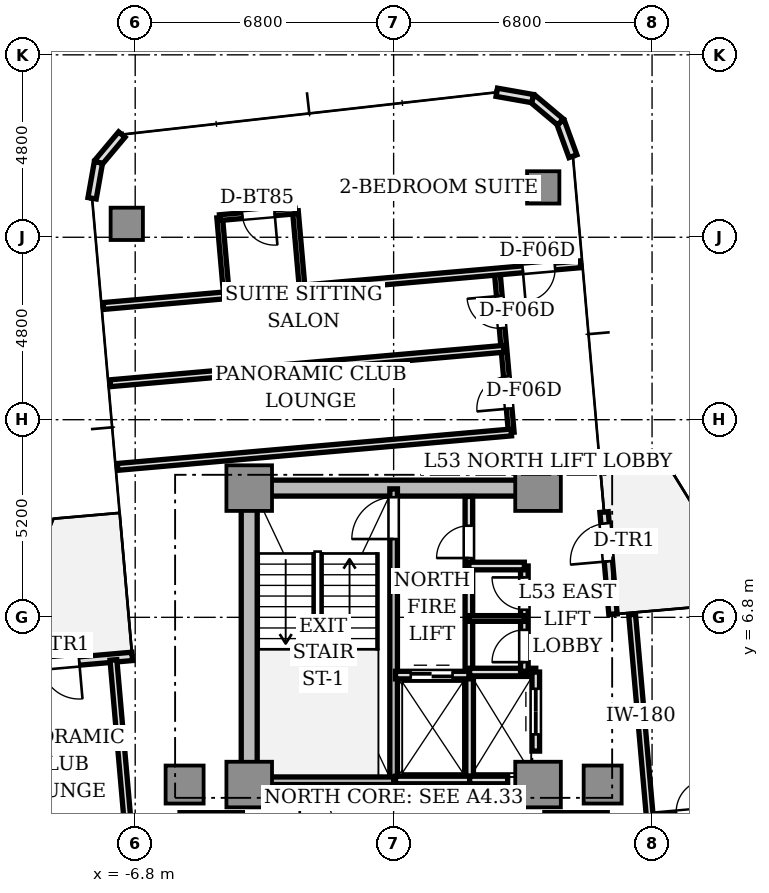
"""IFC4 building model, lengths in metres.
Left out: names, types, materials, properties, quantities, classifications, styles, units other than length and angle.
Written with IfcOpenShell. Run it as: python <this file> out.ifc"""

import sys

from ifc_helpers import new_model, si_unit, direction, frame, frame_2d, origin, origin_2d, place, context, subcontext, project, spatial, rectangle, extrude, source, transform, mapped, element, fill, save


model = new_model("IFC4")
c1 = context("Model", 3, precision=1e-05, world=origin(), true_north=direction((0.0, 1.0)))
c2 = subcontext(c1, "Body", "Model", "MODEL_VIEW")
j1 = project(units=[si_unit("LENGTHUNIT", "METRE"), si_unit("PLANEANGLEUNIT", "RADIAN")], contexts=[c1])
p1 = place(None, origin())
s1 = spatial("IfcSite", under=j1, at=p1, CompositionType="ELEMENT")
p2 = place(p1, origin())
s2 = spatial("IfcBuilding", under=s1, at=p2, CompositionType="ELEMENT")
p3 = place(p2, frame((0.0, 0.0, 191.95)))
s3 = spatial("IfcBuildingStorey", under=s2, at=p3, CompositionType="ELEMENT", Elevation=191.95)
p4 = place(p3, frame((-3.55, 10.2, 0.0), z_axis=(0.0, 0.0, 1.0), x_axis=(1.0, 0.0, 0.0)))
e1 = element("IfcWall", 1, at=p4, inside=s3, PredefinedType="SHEAR", context=c2, shape_type="SweptSolid", body=[
    extrude(rectangle(XDim=7.1, YDim=0.42, at=frame_2d((3.55, 0.0))), origin(), (0.0, 0.0, 1.0), 3.11),
])
p5 = place(p3, frame((-3.8, 2.85, 0.0), z_axis=(0.0, 0.0, 1.0), x_axis=(0.0, 1.0, 0.0)))
e2 = element("IfcWall", 2, at=p5, inside=s3, PredefinedType="SHEAR", context=c2, shape_type="SweptSolid", body=[
    extrude(rectangle(XDim=6.9, YDim=0.42, at=frame_2d((3.45, 0.0))), origin(), (0.0, 0.0, 1.0), 3.11),
])
m1 = source(origin(), c2, "Body", "SweptSolid", [
    extrude(rectangle(XDim=1.2, YDim=1.2, at=origin_2d()), origin(), (0.0, 0.0, 1.0), 3.11),
])
for number, where, z_axis, x_axis in (
    (3, (-3.8, 2.4, 0.0), (0.0, 0.0, 1.0), (1.0, 0.0, 0.0)),
    (4, (3.8, 2.4, 0.0), (0.0, 0.0, 1.0), (1.0, 0.0, 0.0)),
    (5, (-3.8, 10.2, 0.0), (0.0, 0.0, 1.0), (1.0, 0.0, 0.0)),
    (6, (3.8, 10.2, 0.0), (0.0, 0.0, 1.0), (1.0, 0.0, 0.0)),
):
    element("IfcColumn", number, at=place(p3, frame(where, z_axis=z_axis, x_axis=x_axis)), inside=s3, PredefinedType="COLUMN", context=c2, shape_type="MappedRepresentation", body=[
        mapped(m1, transform((0.0, 0.0, 0.0), scale=1.0)),
    ])
m2 = source(origin(), c2, "Body", "SweptSolid", [
    extrude(rectangle(XDim=1.0, YDim=1.0, at=origin_2d()), origin(), (0.0, 0.0, 1.0), 3.11),
])
for number, where, z_axis, x_axis in (
    (7, (5.5, 2.4, 0.0), (0.0, 0.0, 1.0), (1.0, 0.0, 0.0)),
    (8, (-5.5, 2.4, 0.0), (0.0, 0.0, 1.0), (1.0, 0.0, 0.0)),
):
    element("IfcColumn", number, at=place(p3, frame(where, z_axis=z_axis, x_axis=x_axis)), inside=s3, PredefinedType="COLUMN", context=c2, shape_type="MappedRepresentation", body=[
        mapped(m2, transform((0.0, 0.0, 0.0), scale=1.0)),
    ])
m3 = source(origin(), c2, "Body", "SweptSolid", [
    extrude(rectangle(XDim=0.85, YDim=0.85, at=origin_2d()), origin(), (0.0, 0.0, 1.0), 3.11),
])
for number, where, z_axis, x_axis in (
    (9, (3.936, 18.112, 0.0), (0.0, 0.0, 1.0), (1.0, 0.0, 0.0)),
    (10, (-7.022, 17.153, 0.0), (0.0, 0.0, 1.0), (1.0, 0.0, 0.0)),
):
    element("IfcColumn", number, at=place(p3, frame(where, z_axis=z_axis, x_axis=x_axis)), inside=s3, PredefinedType="COLUMN", context=c2, shape_type="MappedRepresentation", body=[
        mapped(m3, transform((0.0, 0.0, 0.0), scale=1.0)),
    ])
p6 = place(p3, frame((5.772, 6.879, 0.0), z_axis=(0.0, 0.0, 1.0), x_axis=(-0.087168071984, 0.996193619346, 0.0)))
e11 = element("IfcWall", 11, at=p6, inside=s3, PredefinedType="STANDARD", context=c2, shape_type="SweptSolid", body=[
    extrude(rectangle(XDim=2.7, YDim=0.22, at=frame_2d((1.35, 0.0))), origin(), (0.0, 0.0, 1.0), 3.11),
])
p7 = place(p6, frame((1.4, 0.0, 0.0)))
e12 = element("IfcOpeningElement", 12, at=p7, cuts=e11, PredefinedType="OPENING", context=c2, shape_type="SweptSolid", body=[
    extrude(rectangle(XDim=1.0, YDim=2.2, at=frame_2d((0.5, 1.1))), frame((0.0, 0.12, 0.0), z_axis=(0.0, -1.0, 0.0), x_axis=(1.0, 0.0, 0.0)), (0.0, 0.0, 1.0), 0.24),
])
p8 = place(p3, frame((4.718, 18.933, 0.0), z_axis=(0.0, 0.0, 1.0), x_axis=(-0.34188635151, 0.939741306239, 0.0)))
e13 = element("IfcWall", 13, at=p8, inside=s3, PredefinedType="STANDARD", context=c2, shape_type="SweptSolid", body=[
    extrude(rectangle(XDim=0.958, YDim=0.22, at=frame_2d((0.479, 0.0))), origin(), (0.0, 0.0, 1.0), 3.11),
])
for number, where, z_axis, x_axis in (
    (14, (4.39, 19.833, 0.0), (0.0, 0.0, 1.0), (-0.766, 0.643, 0.0)),
    (15, (3.657, 20.449, 0.0), (0.0, 0.0, 1.0), (-0.985, 0.174, 0.0)),
):
    element("IfcWall", number, at=place(p3, frame(where, z_axis=z_axis, x_axis=x_axis)), inside=s3, PredefinedType="STANDARD", context=c2, shape_type="SweptSolid", body=[
        extrude(rectangle(XDim=0.958, YDim=0.22, at=frame_2d((0.479, 0.0))), origin(), (0.0, 0.0, 1.0), 3.11),
    ])
for number, where, z_axis, x_axis in (
    (16, (-7.152, 19.503, 0.0), (0.0, 0.0, 1.0), (-0.643, -0.766, 0.0)),
    (17, (-7.768, 18.769, 0.0), (0.0, 0.0, 1.0), (-0.174, -0.985, 0.0)),
):
    element("IfcWall", number, at=place(p3, frame(where, z_axis=z_axis, x_axis=x_axis)), inside=s3, PredefinedType="STANDARD", context=c2, shape_type="SweptSolid", body=[
        extrude(rectangle(XDim=0.958, YDim=0.22, at=frame_2d((0.479, 0.0))), origin(), (0.0, 0.0, 1.0), 3.11),
    ])
p9 = place(p3, frame((-6.879, 5.772, 0.0), z_axis=(0.0, 0.0, 1.0), x_axis=(-0.996193619346, -0.087168071984, 0.0)))
e18 = element("IfcWall", 18, at=p9, inside=s3, PredefinedType="STANDARD", context=c2, shape_type="SweptSolid", body=[
    extrude(rectangle(XDim=2.7, YDim=0.22, at=frame_2d((1.35, 0.0))), origin(), (0.0, 0.0, 1.0), 3.11),
])
p10 = place(p9, frame((1.4, 0.0, 0.0)))
e19 = element("IfcOpeningElement", 19, at=p10, cuts=e18, PredefinedType="OPENING", context=c2, shape_type="SweptSolid", body=[
    extrude(rectangle(XDim=1.0, YDim=2.2, at=frame_2d((0.5, 1.1))), frame((0.0, 0.12, 0.0), z_axis=(0.0, -1.0, 0.0), x_axis=(1.0, 0.0, 0.0)), (0.0, 0.0, 1.0), 0.24),
])
p11 = place(p3, frame((0.0, 2.5, 0.0), z_axis=(0.0, 0.0, 1.0), x_axis=(0.0, 1.0, 0.0)))
e20 = element("IfcWall", 20, at=p11, inside=s3, PredefinedType="SOLIDWALL", context=c2, shape_type="SweptSolid", body=[
    extrude(rectangle(XDim=7.68, YDim=0.2, at=frame_2d((3.84, 0.0))), origin(), (0.0, 0.0, 1.0), 3.11),
])
p12 = place(p11, frame((6.36, 0.0, 0.0)))
e21 = element("IfcOpeningElement", 21, at=p12, cuts=e20, PredefinedType="OPENING", context=c2, shape_type="SweptSolid", body=[
    extrude(rectangle(XDim=1.1, YDim=2.15, at=frame_2d((0.55, 1.075))), frame((0.0, 0.11, 0.0), z_axis=(0.0, -1.0, 0.0), x_axis=(1.0, 0.0, 0.0)), (0.0, 0.0, 1.0), 0.22),
])
p13 = place(p3, frame((-3.72, 2.5, 0.0), z_axis=(0.0, 0.0, 1.0), x_axis=(1.0, 0.0, 0.0)))
e22 = element("IfcWall", 22, at=p13, inside=s3, PredefinedType="SOLIDWALL", context=c2, shape_type="SweptSolid", body=[
    extrude(rectangle(XDim=3.72, YDim=0.2, at=frame_2d((1.86, 0.0))), origin(), (0.0, 0.0, 1.0), 3.11),
])
p14 = place(p3, frame((1.98, 5.32, 0.0), z_axis=(0.0, 0.0, 1.0), x_axis=(0.0, 1.0, 0.0)))
e23 = element("IfcWall", 23, at=p14, inside=s3, PredefinedType="SOLIDWALL", context=c2, shape_type="SweptSolid", body=[
    extrude(rectangle(XDim=4.66, YDim=0.2, at=frame_2d((2.33, 0.0))), origin(), (0.0, 0.0, 1.0), 2.66),
])
p15 = place(p14, frame((3.04, 0.0, 0.0)))
e24 = element("IfcOpeningElement", 24, at=p15, cuts=e23, PredefinedType="OPENING", context=c2, shape_type="SweptSolid", body=[
    extrude(rectangle(XDim=0.85, YDim=2.1, at=frame_2d((0.425, 1.05))), frame((0.0, 0.11, 0.0), z_axis=(0.0, -1.0, 0.0), x_axis=(1.0, 0.0, 0.0)), (0.0, 0.0, 1.0), 0.22),
])
p16 = place(p3, frame((2.0, 2.5, 0.0), z_axis=(0.0, 0.0, 1.0), x_axis=(0.0, 1.0, 0.0)))
e25 = element("IfcWall", 25, at=p16, inside=s3, PredefinedType="SOLIDWALL", context=c2, shape_type="SweptSolid", body=[
    extrude(rectangle(XDim=2.78, YDim=0.2, at=frame_2d((1.39, 0.0))), origin(), (0.0, 0.0, 1.0), 2.66),
])
p17 = place(p3, frame((0.05, 2.52, 0.0), z_axis=(0.0, 0.0, 1.0), x_axis=(1.0, 0.0, 0.0)))
e26 = element("IfcWall", 26, at=p17, inside=s3, PredefinedType="SOLIDWALL", context=c2, shape_type="SweptSolid", body=[
    extrude(rectangle(XDim=1.95, YDim=0.2, at=frame_2d((0.975, 0.0))), origin(), (0.0, 0.0, 1.0), 2.66),
])
p18 = place(p3, frame((0.05, 5.28, 0.0), z_axis=(0.0, 0.0, 1.0), x_axis=(1.0, 0.0, 0.0)))
e27 = element("IfcWall", 27, at=p18, inside=s3, PredefinedType="SOLIDWALL", context=c2, shape_type="SweptSolid", body=[
    extrude(rectangle(XDim=1.93, YDim=0.2, at=frame_2d((0.965, 0.0))), origin(), (0.0, 0.0, 1.0), 2.66),
])
p19 = place(p18, frame((0.4, 0.0, 0.0)))
e28 = element("IfcOpeningElement", 28, at=p19, cuts=e27, PredefinedType="OPENING", context=c2, shape_type="SweptSolid", body=[
    extrude(rectangle(XDim=1.1, YDim=2.2, at=frame_2d((0.55, 1.1))), frame((0.0, 0.11, 0.0), z_axis=(0.0, -1.0, 0.0), x_axis=(1.0, 0.0, 0.0)), (0.0, 0.0, 1.0), 0.22),
])
p20 = place(p3, frame((2.0, 2.52, 0.0), z_axis=(0.0, 0.0, 1.0), x_axis=(1.0, 0.0, 0.0)))
e29 = element("IfcWall", 29, at=p20, inside=s3, PredefinedType="SOLIDWALL", context=c2, shape_type="SweptSolid", body=[
    extrude(rectangle(XDim=1.0, YDim=0.2, at=frame_2d((0.5, 0.0))), origin(), (0.0, 0.0, 1.0), 2.66),
])
p21 = place(p3, frame((2.0, 5.36, 0.0), z_axis=(0.0, 0.0, 1.0), x_axis=(1.0, 0.0, 0.0)))
e30 = element("IfcWall", 30, at=p21, inside=s3, PredefinedType="SOLIDWALL", context=c2, shape_type="SweptSolid", body=[
    extrude(rectangle(XDim=1.74, YDim=0.2, at=frame_2d((0.87, 0.0))), origin(), (0.0, 0.0, 1.0), 2.66),
])
p22 = place(p3, frame((3.74, 3.28, 0.0), z_axis=(0.0, 0.0, 1.0), x_axis=(0.0, 1.0, 0.0)))
e31 = element("IfcWall", 31, at=p22, inside=s3, PredefinedType="SOLIDWALL", context=c2, shape_type="SweptSolid", body=[
    extrude(rectangle(XDim=2.08, YDim=0.2, at=frame_2d((1.04, 0.0))), origin(), (0.0, 0.0, 1.0), 2.66),
])
p23 = place(p22, frame((0.44, 0.0, 0.0)))
e32 = element("IfcOpeningElement", 32, at=p23, cuts=e31, PredefinedType="OPENING", context=c2, shape_type="SweptSolid", body=[
    extrude(rectangle(XDim=1.2, YDim=2.2, at=frame_2d((0.6, 1.1))), frame((0.0, 0.11, 0.0), z_axis=(0.0, -1.0, 0.0), x_axis=(1.0, 0.0, 0.0)), (0.0, 0.0, 1.0), 0.22),
])
for number, where, z_axis, x_axis in (
    (33, (3.98, 1.56, 0.0), (0.0, 0.0, 1.0), (1.0, 0.0, 0.0)),
    (34, (-5.62, 1.56, 0.0), (0.0, 0.0, 1.0), (1.0, 0.0, 0.0)),
):
    element("IfcWall", number, at=place(p3, frame(where, z_axis=z_axis, x_axis=x_axis)), inside=s3, PredefinedType="SOLIDWALL", context=c2, shape_type="SweptSolid", body=[
        extrude(rectangle(XDim=1.64, YDim=0.2, at=frame_2d((0.82, 0.0))), origin(), (0.0, 0.0, 1.0), 2.66),
    ])
p24 = place(p3, frame((3.44, 5.38, 0.0), z_axis=(0.0, 0.0, 1.0), x_axis=(0.0, 1.0, 0.0)))
e35 = element("IfcWall", 35, at=p24, inside=s3, PredefinedType="SOLIDWALL", context=c2, shape_type="SweptSolid", body=[
    extrude(rectangle(XDim=2.77, YDim=0.2, at=frame_2d((1.385, 0.0))), origin(), (0.0, 0.0, 1.0), 2.66),
])
p25 = place(p24, frame((0.24, 0.0, 0.0)))
e36 = element("IfcOpeningElement", 36, at=p25, cuts=e35, PredefinedType="OPENING", context=c2, shape_type="SweptSolid", body=[
    extrude(rectangle(XDim=0.85, YDim=2.1, at=frame_2d((0.425, 1.05))), frame((0.0, 0.11, 0.0), z_axis=(0.0, -1.0, 0.0), x_axis=(1.0, 0.0, 0.0)), (0.0, 0.0, 1.0), 0.22),
])
p26 = place(p24, frame((1.62, 0.0, 0.0)))
e37 = element("IfcOpeningElement", 37, at=p26, cuts=e35, PredefinedType="OPENING", context=c2, shape_type="SweptSolid", body=[
    extrude(rectangle(XDim=0.85, YDim=2.1, at=frame_2d((0.425, 1.05))), frame((0.0, 0.11, 0.0), z_axis=(0.0, -1.0, 0.0), x_axis=(1.0, 0.0, 0.0)), (0.0, 0.0, 1.0), 0.22),
])
p27 = place(p3, frame((1.98, 8.15, 0.0), z_axis=(0.0, 0.0, 1.0), x_axis=(1.0, 0.0, 0.0)))
e38 = element("IfcWall", 38, at=p27, inside=s3, PredefinedType="SOLIDWALL", context=c2, shape_type="SweptSolid", body=[
    extrude(rectangle(XDim=1.46, YDim=0.2, at=frame_2d((0.73, 0.0))), origin(), (0.0, 0.0, 1.0), 2.66),
])
p28 = place(p3, frame((1.98, 6.77, 0.0), z_axis=(0.0, 0.0, 1.0), x_axis=(1.0, 0.0, 0.0)))
e39 = element("IfcWall", 39, at=p28, inside=s3, PredefinedType="PARTITIONING", context=c2, shape_type="SweptSolid", body=[
    extrude(rectangle(XDim=1.46, YDim=0.15, at=frame_2d((0.73, 0.0))), origin(), (0.0, 0.0, 1.0), 2.66),
])
p29 = place(p3, frame((6.741, 1.543, 0.0), z_axis=(0.0, 0.0, 1.0), x_axis=(0.996195062465, 0.087151577845, 0.0)))
e40 = element("IfcWall", 40, at=p29, inside=s3, PredefinedType="PARTITIONING", context=c2, shape_type="SweptSolid", body=[
    extrude(rectangle(XDim=13.2, YDim=0.15, at=frame_2d((6.6, 0.0))), origin(), (0.0, 0.0, 1.0), 2.66),
])
p30 = place(p29, frame((0.7, 0.0, 0.0)))
e41 = element("IfcOpeningElement", 41, at=p30, cuts=e40, PredefinedType="OPENING", context=c2, shape_type="SweptSolid", body=[
    extrude(rectangle(XDim=0.85, YDim=2.1, at=frame_2d((0.425, 1.05))), frame((0.0, 0.085, 0.0), z_axis=(0.0, -1.0, 0.0), x_axis=(1.0, 0.0, 0.0)), (0.0, 0.0, 1.0), 0.17),
])
p31 = place(p29, frame((4.952, 0.0, 0.0)))
e42 = element("IfcOpeningElement", 42, at=p31, cuts=e40, PredefinedType="OPENING", context=c2, shape_type="SweptSolid", body=[
    extrude(rectangle(XDim=0.85, YDim=2.1, at=frame_2d((0.425, 1.05))), frame((0.0, 0.085, 0.0), z_axis=(0.0, -1.0, 0.0), x_axis=(1.0, 0.0, 0.0)), (0.0, 0.0, 1.0), 0.17),
])
p32 = place(p29, frame((9.44, 0.0, 0.0)))
e43 = element("IfcOpeningElement", 43, at=p32, cuts=e40, PredefinedType="OPENING", context=c2, shape_type="SweptSolid", body=[
    extrude(rectangle(XDim=0.85, YDim=2.1, at=frame_2d((0.425, 1.05))), frame((0.0, 0.085, 0.0), z_axis=(0.0, -1.0, 0.0), x_axis=(1.0, 0.0, 0.0)), (0.0, 0.0, 1.0), 0.17),
])
p33 = place(p3, frame((6.741, 1.543, 0.0), z_axis=(0.0, 0.0, 1.0), x_axis=(-0.087161289348, 0.996194212812, 0.0)))
e44 = element("IfcWall", 44, at=p33, inside=s3, PredefinedType="PARTITIONING", context=c2, shape_type="SweptSolid", body=[
    extrude(rectangle(XDim=5.35, YDim=0.18, at=frame_2d((2.675, 0.0))), origin(), (0.0, 0.0, 1.0), 2.66),
])
p34 = place(p3, frame((3.095, 11.664, 0.0), z_axis=(0.0, 0.0, 1.0), x_axis=(-0.087142722004, 0.996195837173, 0.0)))
e45 = element("IfcWall", 45, at=p34, inside=s3, PredefinedType="PARTITIONING", context=c2, shape_type="SweptSolid", body=[
    extrude(rectangle(XDim=4.25, YDim=0.15, at=frame_2d((2.125, 0.0))), origin(), (0.0, 0.0, 1.0), 2.66),
])
p35 = place(p34, frame((0.63, 0.0, 0.0)))
e46 = element("IfcOpeningElement", 46, at=p35, cuts=e45, PredefinedType="OPENING", context=c2, shape_type="SweptSolid", body=[
    extrude(rectangle(XDim=0.85, YDim=2.1, at=frame_2d((0.425, 1.05))), frame((0.0, 0.085, 0.0), z_axis=(0.0, -1.0, 0.0), x_axis=(1.0, 0.0, 0.0)), (0.0, 0.0, 1.0), 0.17),
])
p36 = place(p34, frame((2.755, 0.0, 0.0)))
e47 = element("IfcOpeningElement", 47, at=p36, cuts=e45, PredefinedType="OPENING", context=c2, shape_type="SweptSolid", body=[
    extrude(rectangle(XDim=0.85, YDim=2.1, at=frame_2d((0.425, 1.05))), frame((0.0, 0.085, 0.0), z_axis=(0.0, -1.0, 0.0), x_axis=(1.0, 0.0, 0.0)), (0.0, 0.0, 1.0), 0.17),
])
p37 = place(p3, frame((3.095, 11.664, 0.0), z_axis=(0.0, 0.0, 1.0), x_axis=(-0.996196061386, -0.087140158824, 0.0)))
e48 = element("IfcWall", 48, at=p37, inside=s3, PredefinedType="PARTITIONING", context=c2, shape_type="SweptSolid", body=[
    extrude(rectangle(XDim=10.4, YDim=0.18, at=frame_2d((5.2, 0.0))), origin(), (0.0, 0.0, 1.0), 2.66),
])
p38 = place(p3, frame((2.903, 13.866, 0.0), z_axis=(0.0, 0.0, 1.0), x_axis=(-0.996194201607, -0.087161417409, 0.0)))
e49 = element("IfcWall", 49, at=p38, inside=s3, PredefinedType="PARTITIONING", context=c2, shape_type="SweptSolid", body=[
    extrude(rectangle(XDim=10.4, YDim=0.18, at=frame_2d((5.2, 0.0))), origin(), (0.0, 0.0, 1.0), 2.66),
])
p39 = place(p3, frame((4.917, 16.09, 0.0), z_axis=(0.0, 0.0, 1.0), x_axis=(-0.996196619285, -0.087133780622, 0.0)))
e50 = element("IfcWall", 50, at=p39, inside=s3, PredefinedType="PARTITIONING", context=c2, shape_type="SweptSolid", body=[
    extrude(rectangle(XDim=12.6, YDim=0.18, at=frame_2d((6.3, 0.0))), origin(), (0.0, 0.0, 1.0), 2.66),
])
p40 = place(p39, frame((0.675, 0.0, 0.0)))
e51 = element("IfcOpeningElement", 51, at=p40, cuts=e50, PredefinedType="OPENING", context=c2, shape_type="SweptSolid", body=[
    extrude(rectangle(XDim=0.85, YDim=2.1, at=frame_2d((0.425, 1.05))), frame((0.0, 0.1, 0.0), z_axis=(0.0, -1.0, 0.0), x_axis=(1.0, 0.0, 0.0)), (0.0, 0.0, 1.0), 0.2),
])
for number, where, z_axis, x_axis in (
    (52, (-4.398, 15.275, 0.0), (0.0, 0.0, 1.0), (-0.087, 0.996, 0.0)),
    (53, (-2.406, 15.449, 0.0), (0.0, 0.0, 1.0), (-0.087, 0.996, 0.0)),
):
    element("IfcWall", number, at=place(p3, frame(where, z_axis=z_axis, x_axis=x_axis)), inside=s3, PredefinedType="PARTITIONING", context=c2, shape_type="SweptSolid", body=[
        extrude(rectangle(XDim=2.05, YDim=0.15, at=frame_2d((1.025, 0.0))), origin(), (0.0, 0.0, 1.0), 2.66),
    ])
p41 = place(p3, frame((-2.584, 17.491, 0.0), z_axis=(0.0, 0.0, 1.0), x_axis=(-0.99619464492, -0.087156350505, 0.0)))
e54 = element("IfcWall", 54, at=p41, inside=s3, PredefinedType="PARTITIONING", context=c2, shape_type="SweptSolid", body=[
    extrude(rectangle(XDim=2.0, YDim=0.15, at=frame_2d((1.0, 0.0))), origin(), (0.0, 0.0, 1.0), 2.63),
])
p42 = place(p41, frame((0.55, 0.0, 0.0)))
e55 = element("IfcOpeningElement", 55, at=p42, cuts=e54, PredefinedType="OPENING", context=c2, shape_type="SweptSolid", body=[
    extrude(rectangle(XDim=0.85, YDim=2.1, at=frame_2d((0.425, 1.05))), frame((0.0, 0.085, 0.0), z_axis=(0.0, -1.0, 0.0), x_axis=(1.0, 0.0, 0.0)), (0.0, 0.0, 1.0), 0.17),
])
p43 = place(p3, frame((-7.373, 5.679, 0.0), z_axis=(0.0, 0.0, 1.0), x_axis=(0.087161289348, -0.996194212812, 0.0)))
e56 = element("IfcWall", 56, at=p43, inside=s3, PredefinedType="PARTITIONING", context=c2, shape_type="SweptSolid", body=[
    extrude(rectangle(XDim=5.35, YDim=0.18, at=frame_2d((2.675, 0.0))), origin(), (0.0, 0.0, 1.0), 2.66),
])
m4 = source(origin(), c2, "Body", "SweptSolid", [
    extrude(rectangle(XDim=1.0, YDim=0.05, at=origin_2d()), origin(), (0.0, 0.0, 1.0), 2.2),
])
p44 = place(p7, frame((0.5, 0.0, 0.0)))
e57 = element("IfcDoor", 57, at=p44, inside=s3, OperationType="SINGLE_SWING_LEFT", PredefinedType="DOOR", context=c2, shape_type="MappedRepresentation", body=[
    mapped(m4, transform((0.0, 0.0, 0.0), scale=1.0)),
])
fill(e12, e57)
p45 = place(p10, frame((0.5, 0.0, 0.0)))
e58 = element("IfcDoor", 58, at=p45, inside=s3, OperationType="SINGLE_SWING_LEFT", PredefinedType="DOOR", context=c2, shape_type="MappedRepresentation", body=[
    mapped(m4, transform((0.0, 0.0, 0.0), scale=1.0)),
])
fill(e19, e58)
m5 = source(origin(), c2, "Body", "SweptSolid", [
    extrude(rectangle(XDim=1.1, YDim=0.05, at=origin_2d()), origin(), (0.0, 0.0, 1.0), 2.15),
])
p46 = place(p12, frame((0.55, 0.0, 0.0)))
e59 = element("IfcDoor", 59, at=p46, inside=s3, OperationType="SINGLE_SWING_LEFT", PredefinedType="DOOR", context=c2, shape_type="MappedRepresentation", body=[
    mapped(m5, transform((0.0, 0.0, 0.0), scale=1.0)),
])
fill(e21, e59)
m6 = source(origin(), c2, "Body", "SweptSolid", [
    extrude(rectangle(XDim=0.85, YDim=0.05, at=origin_2d()), origin(), (0.0, 0.0, 1.0), 2.1),
])
p47 = place(p15, frame((0.425, 0.0, 0.0)))
e60 = element("IfcDoor", 60, at=p47, inside=s3, OperationType="SINGLE_SWING_LEFT", PredefinedType="DOOR", context=c2, shape_type="MappedRepresentation", body=[
    mapped(m6, transform((0.0, 0.0, 0.0), scale=1.0)),
])
fill(e24, e60)
m7 = source(origin(), c2, "Body", "SweptSolid", [
    extrude(rectangle(XDim=1.1, YDim=0.05, at=origin_2d()), origin(), (0.0, 0.0, 1.0), 2.2),
])
p48 = place(p19, frame((0.55, 0.0, 0.0)))
e61 = element("IfcDoor", 61, at=p48, inside=s3, OperationType="DOUBLE_DOOR_SLIDING", PredefinedType="DOOR", context=c2, shape_type="MappedRepresentation", body=[
    mapped(m7, transform((0.0, 0.0, 0.0), scale=1.0)),
])
fill(e28, e61)
m8 = source(origin(), c2, "Body", "SweptSolid", [
    extrude(rectangle(XDim=1.2, YDim=0.05, at=origin_2d()), origin(), (0.0, 0.0, 1.0), 2.2),
])
p49 = place(p23, frame((0.6, 0.0, 0.0)))
e62 = element("IfcDoor", 62, at=p49, inside=s3, OperationType="DOUBLE_DOOR_SLIDING", PredefinedType="DOOR", context=c2, shape_type="MappedRepresentation", body=[
    mapped(m8, transform((0.0, 0.0, 0.0), scale=1.0)),
])
fill(e32, e62)
p50 = place(p25, frame((0.425, 0.0, 0.0)))
e63 = element("IfcDoor", 63, at=p50, inside=s3, OperationType="SINGLE_SWING_LEFT", PredefinedType="DOOR", context=c2, shape_type="MappedRepresentation", body=[
    mapped(m6, transform((0.0, 0.0, 0.0), scale=1.0)),
])
fill(e36, e63)
p51 = place(p26, frame((0.425, 0.0, 0.0)))
e64 = element("IfcDoor", 64, at=p51, inside=s3, OperationType="SINGLE_SWING_RIGHT", PredefinedType="DOOR", context=c2, shape_type="MappedRepresentation", body=[
    mapped(m6, transform((0.0, 0.0, 0.0), scale=1.0)),
])
fill(e37, e64)
p52 = place(p30, frame((0.425, 0.0, 0.0)))
e65 = element("IfcDoor", 65, at=p52, inside=s3, OperationType="SINGLE_SWING_RIGHT", PredefinedType="DOOR", context=c2, shape_type="MappedRepresentation", body=[
    mapped(m6, transform((0.0, 0.0, 0.0), scale=1.0)),
])
fill(e41, e65)
p53 = place(p35, frame((0.425, 0.0, 0.0)))
e66 = element("IfcDoor", 66, at=p53, inside=s3, OperationType="SINGLE_SWING_LEFT", PredefinedType="DOOR", context=c2, shape_type="MappedRepresentation", body=[
    mapped(m6, transform((0.0, 0.0, 0.0), scale=1.0)),
])
fill(e46, e66)
p54 = place(p36, frame((0.425, 0.0, 0.0)))
e67 = element("IfcDoor", 67, at=p54, inside=s3, OperationType="SINGLE_SWING_RIGHT", PredefinedType="DOOR", context=c2, shape_type="MappedRepresentation", body=[
    mapped(m6, transform((0.0, 0.0, 0.0), scale=1.0)),
])
fill(e47, e67)
p55 = place(p42, frame((0.425, 0.0, 0.0)))
e68 = element("IfcDoor", 68, at=p55, inside=s3, OperationType="SINGLE_SWING_LEFT", PredefinedType="DOOR", context=c2, shape_type="MappedRepresentation", body=[
    mapped(m6, transform((0.0, 0.0, 0.0), scale=1.0)),
])
fill(e55, e68)
p56 = place(p40, frame((0.425, 0.0, 0.0)))
e69 = element("IfcDoor", 69, at=p56, inside=s3, OperationType="SINGLE_SWING_RIGHT", PredefinedType="DOOR", context=c2, shape_type="MappedRepresentation", body=[
    mapped(m6, transform((0.0, 0.0, 0.0), scale=1.0)),
])
fill(e51, e69)
save(model, sys.argv[1])
